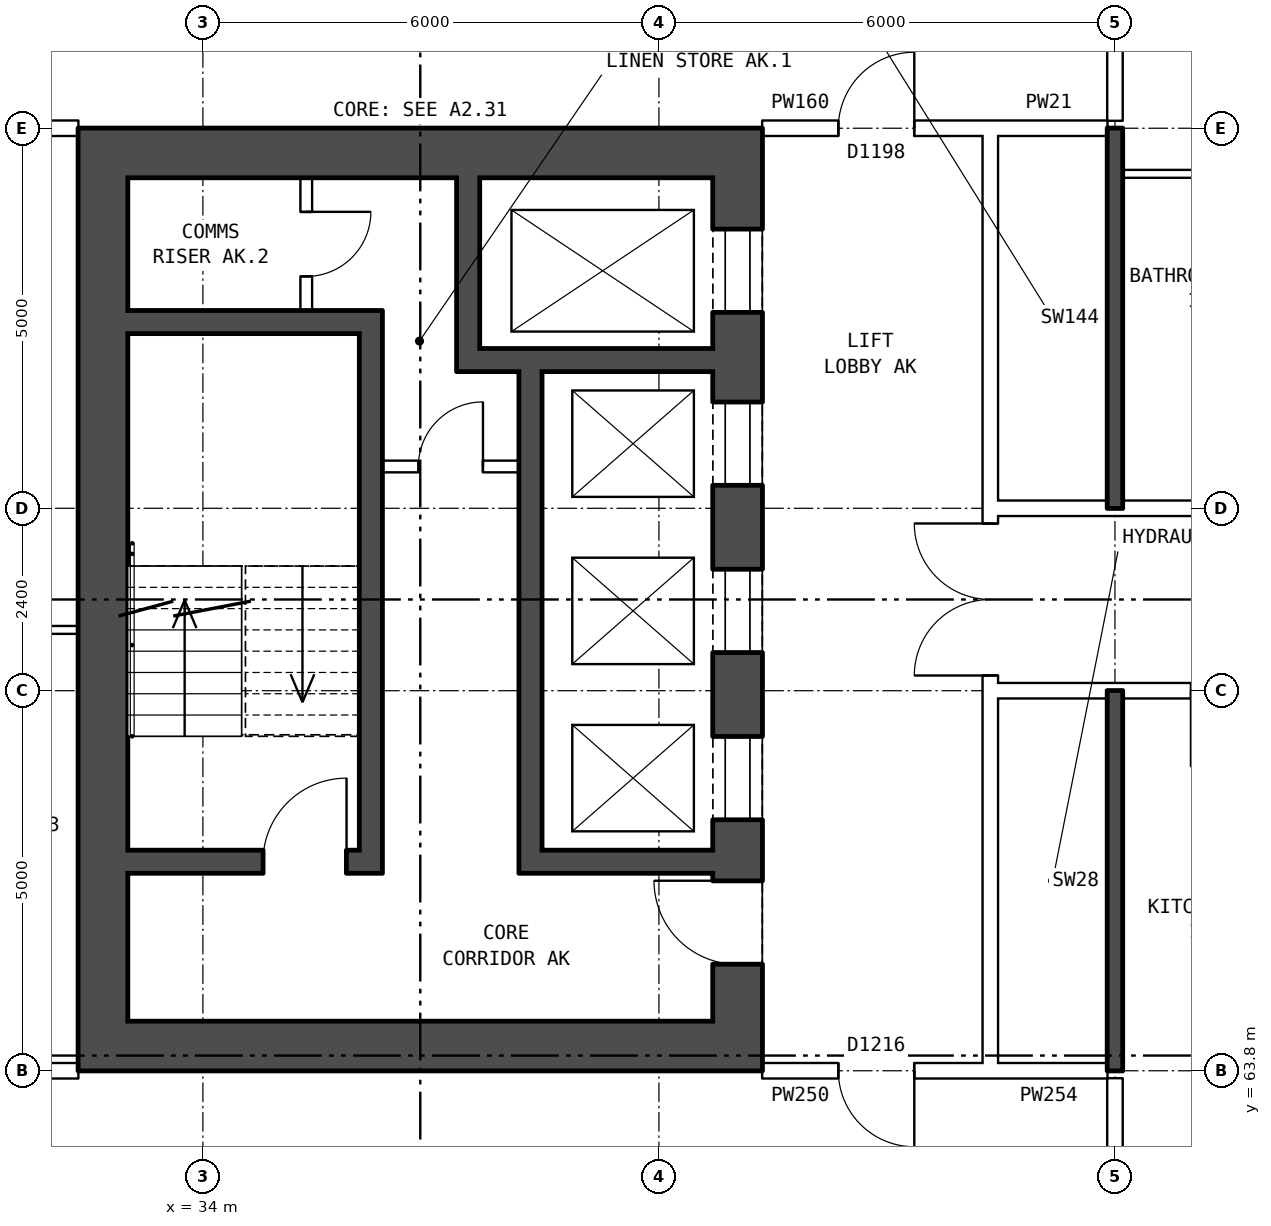
"""IFC4 building model, lengths in metres.
Left out: names, types, materials, properties, quantities, classifications, styles, units other than length and angle.
Written with IfcOpenShell. Run it as: python <this file> out.ifc"""

import sys

from ifc_helpers import new_model, si_unit, direction, frame, frame_2d, origin, place, context, subcontext, project, spatial, rectangle, extrude, element, fill, save


model = new_model("IFC4")
c1 = context("Model", 3, precision=1e-05, world=origin(), true_north=direction((0.0, 1.0)))
c2 = subcontext(c1, "Body", "Model", "MODEL_VIEW")
j1 = project(units=[si_unit("LENGTHUNIT", "METRE"), si_unit("PLANEANGLEUNIT", "RADIAN")], contexts=[c1])
p1 = place(None, origin())
s1 = spatial("IfcSite", under=j1, at=p1, CompositionType="ELEMENT")
p2 = place(p1, origin())
s2 = spatial("IfcBuilding", under=s1, at=p2, CompositionType="ELEMENT")
p3 = place(p2, frame((0.0, 0.0, 108.8)))
s3 = spatial("IfcBuildingStorey", under=s2, at=p3, CompositionType="ELEMENT", Elevation=108.8)
p4 = place(p3, frame((41.035, 75.55, 0.0), z_axis=(0.0, 0.0, 1.0), x_axis=(0.0, -1.0, 0.0)))
e1 = element("IfcWall", 1, at=p4, inside=s3, PredefinedType="SHEAR", context=c2, shape_type="SweptSolid", body=[
    extrude(rectangle(XDim=11.1, YDim=0.65, at=frame_2d((5.55, 0.0))), origin(), (0.0, 0.0, 1.0), 2.85),
])
p5 = place(p4, frame((0.675, 0.0, 0.0)))
e2 = element("IfcOpeningElement", 2, at=p5, cuts=e1, PredefinedType="OPENING", context=c2, shape_type="SweptSolid", body=[
    extrude(rectangle(XDim=1.1, YDim=2.1, at=frame_2d((0.55, 1.05))), frame((0.0, 0.335, 0.0), z_axis=(0.0, -1.0, 0.0), x_axis=(1.0, 0.0, 0.0)), (0.0, 0.0, 1.0), 0.67),
])
p6 = place(p4, frame((2.95, 0.0, 0.0)))
e3 = element("IfcOpeningElement", 3, at=p6, cuts=e1, PredefinedType="OPENING", context=c2, shape_type="SweptSolid", body=[
    extrude(rectangle(XDim=1.1, YDim=2.1, at=frame_2d((0.55, 1.05))), frame((0.0, 0.335, 0.0), z_axis=(0.0, -1.0, 0.0), x_axis=(1.0, 0.0, 0.0)), (0.0, 0.0, 1.0), 0.67),
])
p7 = place(p4, frame((5.15, 0.0, 0.0)))
e4 = element("IfcOpeningElement", 4, at=p7, cuts=e1, PredefinedType="OPENING", context=c2, shape_type="SweptSolid", body=[
    extrude(rectangle(XDim=1.1, YDim=2.1, at=frame_2d((0.55, 1.05))), frame((0.0, 0.335, 0.0), z_axis=(0.0, -1.0, 0.0), x_axis=(1.0, 0.0, 0.0)), (0.0, 0.0, 1.0), 0.67),
])
p8 = place(p4, frame((7.35, 0.0, 0.0)))
e5 = element("IfcOpeningElement", 5, at=p8, cuts=e1, PredefinedType="OPENING", context=c2, shape_type="SweptSolid", body=[
    extrude(rectangle(XDim=1.1, YDim=2.1, at=frame_2d((0.55, 1.05))), frame((0.0, 0.335, 0.0), z_axis=(0.0, -1.0, 0.0), x_axis=(1.0, 0.0, 0.0)), (0.0, 0.0, 1.0), 0.67),
])
p9 = place(p4, frame((9.25, 0.0, 0.0)))
e6 = element("IfcOpeningElement", 6, at=p9, cuts=e1, PredefinedType="OPENING", context=c2, shape_type="SweptSolid", body=[
    extrude(rectangle(XDim=1.1, YDim=2.1, at=frame_2d((0.55, 1.05))), frame((0.0, 0.335, 0.0), z_axis=(0.0, -1.0, 0.0), x_axis=(1.0, 0.0, 0.0)), (0.0, 0.0, 1.0), 0.67),
])
p10 = place(p3, frame((32.685, 75.55, 0.0), z_axis=(0.0, 0.0, 1.0), x_axis=(0.0, -1.0, 0.0)))
e7 = element("IfcWall", 7, at=p10, inside=s3, PredefinedType="SHEAR", context=c2, shape_type="SweptSolid", body=[
    extrude(rectangle(XDim=11.1, YDim=0.65, at=frame_2d((5.55, 0.0))), origin(), (0.0, 0.0, 1.0), 2.85),
])
for number, where, z_axis, x_axis in (
    (8, (41.36, 75.875, 0.0), (0.0, 0.0, 1.0), (-1.0, 0.0, 0.0)),
    (9, (41.36, 64.125, 0.0), (0.0, 0.0, 1.0), (-1.0, 0.0, 0.0)),
):
    element("IfcWall", number, at=place(p3, frame(where, z_axis=z_axis, x_axis=x_axis)), inside=s3, PredefinedType="SHEAR", context=c2, shape_type="SweptSolid", body=[
        extrude(rectangle(XDim=9.0, YDim=0.65, at=frame_2d((4.5, 0.0))), origin(), (0.0, 0.0, 1.0), 2.85),
    ])
p11 = place(p3, frame((36.06, 73.65, 0.0), z_axis=(0.0, 0.0, 1.0), x_axis=(-1.0, 0.0, 0.0)))
e10 = element("IfcWall", 10, at=p11, inside=s3, PredefinedType="SHEAR", context=c2, shape_type="SweptSolid", body=[
    extrude(rectangle(XDim=3.05, YDim=0.3, at=frame_2d((1.525, 0.0))), origin(), (0.0, 0.0, 1.0), 2.85),
])
p12 = place(p3, frame((40.71, 73.15, 0.0), z_axis=(0.0, 0.0, 1.0), x_axis=(-1.0, 0.0, 0.0)))
e11 = element("IfcWall", 11, at=p12, inside=s3, PredefinedType="SHEAR", context=c2, shape_type="SweptSolid", body=[
    extrude(rectangle(XDim=3.37, YDim=0.3, at=frame_2d((1.685, 0.0))), origin(), (0.0, 0.0, 1.0), 2.85),
])
p13 = place(p3, frame((38.16, 71.75, 0.0), z_axis=(0.0, 0.0, 1.0), x_axis=(-1.0, 0.0, 0.0)))
e12 = element("IfcWall", 12, at=p13, inside=s3, PredefinedType="PARTITIONING", context=c2, shape_type="SweptSolid", body=[
    extrude(rectangle(XDim=1.8, YDim=0.15, at=frame_2d((0.9, 0.0))), origin(), (0.0, 0.0, 1.0), 2.85),
])
p14 = place(p13, frame((0.475, 0.0, 0.0)))
e13 = element("IfcOpeningElement", 13, at=p14, cuts=e12, PredefinedType="OPENING", context=c2, shape_type="SweptSolid", body=[
    extrude(rectangle(XDim=0.85, YDim=2.1, at=frame_2d((0.425, 1.05))), frame((0.0, 0.085, 0.0), z_axis=(0.0, -1.0, 0.0), x_axis=(1.0, 0.0, 0.0)), (0.0, 0.0, 1.0), 0.17),
])
p15 = place(p3, frame((40.71, 66.55, 0.0), z_axis=(0.0, 0.0, 1.0), x_axis=(-1.0, 0.0, 0.0)))
e14 = element("IfcWall", 14, at=p15, inside=s3, PredefinedType="SHEAR", context=c2, shape_type="SweptSolid", body=[
    extrude(rectangle(XDim=2.25, YDim=0.3, at=frame_2d((1.125, 0.0))), origin(), (0.0, 0.0, 1.0), 2.85),
])
p16 = place(p3, frame((36.06, 66.55, 0.0), z_axis=(0.0, 0.0, 1.0), x_axis=(-1.0, 0.0, 0.0)))
e15 = element("IfcWall", 15, at=p16, inside=s3, PredefinedType="SHEAR", context=c2, shape_type="SweptSolid", body=[
    extrude(rectangle(XDim=3.05, YDim=0.3, at=frame_2d((1.525, 0.0))), origin(), (0.0, 0.0, 1.0), 2.85),
])
p17 = place(p16, frame((0.17, 0.0, 0.0)))
e16 = element("IfcOpeningElement", 16, at=p17, cuts=e15, PredefinedType="OPENING", context=c2, shape_type="SweptSolid", body=[
    extrude(rectangle(XDim=1.1, YDim=2.1, at=frame_2d((0.55, 1.05))), frame((0.0, 0.16, 0.0), z_axis=(0.0, -1.0, 0.0), x_axis=(1.0, 0.0, 0.0)), (0.0, 0.0, 1.0), 0.32),
])
p18 = place(p3, frame((38.31, 73.0, 0.0), z_axis=(0.0, 0.0, 1.0), x_axis=(0.0, -1.0, 0.0)))
e17 = element("IfcWall", 17, at=p18, inside=s3, PredefinedType="SHEAR", context=c2, shape_type="SweptSolid", body=[
    extrude(rectangle(XDim=6.6, YDim=0.3, at=frame_2d((3.3, 0.0))), origin(), (0.0, 0.0, 1.0), 2.85),
])
p19 = place(p3, frame((37.49, 75.55, 0.0), z_axis=(0.0, 0.0, 1.0), x_axis=(0.0, -1.0, 0.0)))
e18 = element("IfcWall", 18, at=p19, inside=s3, PredefinedType="SHEAR", context=c2, shape_type="SweptSolid", body=[
    extrude(rectangle(XDim=2.25, YDim=0.3, at=frame_2d((1.125, 0.0))), origin(), (0.0, 0.0, 1.0), 2.85),
])
p20 = place(p3, frame((36.21, 73.8, 0.0), z_axis=(0.0, 0.0, 1.0), x_axis=(0.0, -1.0, 0.0)))
e19 = element("IfcWall", 19, at=p20, inside=s3, PredefinedType="SHEAR", context=c2, shape_type="SweptSolid", body=[
    extrude(rectangle(XDim=7.4, YDim=0.3, at=frame_2d((3.7, 0.0))), origin(), (0.0, 0.0, 1.0), 2.85),
])
p21 = place(p3, frame((35.36, 75.55, 0.0), z_axis=(0.0, 0.0, 1.0), x_axis=(0.0, -1.0, 0.0)))
e20 = element("IfcWall", 20, at=p21, inside=s3, PredefinedType="PARTITIONING", context=c2, shape_type="SweptSolid", body=[
    extrude(rectangle(XDim=1.75, YDim=0.15, at=frame_2d((0.875, 0.0))), origin(), (0.0, 0.0, 1.0), 2.85),
])
p22 = place(p21, frame((0.45, 0.0, 0.0)))
e21 = element("IfcOpeningElement", 21, at=p22, cuts=e20, PredefinedType="OPENING", context=c2, shape_type="SweptSolid", body=[
    extrude(rectangle(XDim=0.85, YDim=2.1, at=frame_2d((0.425, 1.05))), frame((0.0, 0.085, 0.0), z_axis=(0.0, -1.0, 0.0), x_axis=(1.0, 0.0, 0.0)), (0.0, 0.0, 1.0), 0.17),
])
p23 = place(p3, frame((44.36, 63.9, 0.0), z_axis=(0.0, 0.0, 1.0), x_axis=(0.0, 1.0, 0.0)))
e22 = element("IfcWall", 22, at=p23, inside=s3, PredefinedType="PARTITIONING", context=c2, shape_type="SweptSolid", body=[
    extrude(rectangle(XDim=12.2, YDim=0.2, at=frame_2d((6.1, 0.0))), origin(), (0.0, 0.0, 1.0), 2.85),
])
p24 = place(p23, frame((5.1, 0.0, 0.0)))
e23 = element("IfcOpeningElement", 23, at=p24, cuts=e22, PredefinedType="OPENING", context=c2, shape_type="SweptSolid", body=[
    extrude(rectangle(XDim=2.0, YDim=2.1, at=frame_2d((1.0, 1.05))), frame((0.0, 0.11, 0.0), z_axis=(0.0, -1.0, 0.0), x_axis=(1.0, 0.0, 0.0)), (0.0, 0.0, 1.0), 0.22),
])
p25 = place(p3, frame((28.0, 63.8, 0.0), z_axis=(0.0, 0.0, 1.0), x_axis=(1.0, 0.0, 0.0)))
e24 = element("IfcWall", 24, at=p25, inside=s3, PredefinedType="PARTITIONING", context=c2, shape_type="SweptSolid", body=[
    extrude(rectangle(XDim=4.36, YDim=0.2, at=frame_2d((2.18, 0.0))), origin(), (0.0, 0.0, 1.0), 2.85),
])
p26 = place(p3, frame((41.36, 63.8, 0.0), z_axis=(0.0, 0.0, 1.0), x_axis=(1.0, 0.0, 0.0)))
e25 = element("IfcWall", 25, at=p26, inside=s3, PredefinedType="PARTITIONING", context=c2, shape_type="SweptSolid", body=[
    extrude(rectangle(XDim=3.0, YDim=0.2, at=frame_2d((1.5, 0.0))), origin(), (0.0, 0.0, 1.0), 2.85),
])
p27 = place(p26, frame((1.0, 0.0, 0.0)))
e26 = element("IfcOpeningElement", 26, at=p27, cuts=e25, PredefinedType="OPENING", context=c2, shape_type="SweptSolid", body=[
    extrude(rectangle(XDim=1.0, YDim=2.1, at=frame_2d((0.5, 1.05))), frame((0.0, 0.11, 0.0), z_axis=(0.0, -1.0, 0.0), x_axis=(1.0, 0.0, 0.0)), (0.0, 0.0, 1.0), 0.22),
])
p28 = place(p3, frame((44.36, 63.8, 0.0), z_axis=(0.0, 0.0, 1.0), x_axis=(1.0, 0.0, 0.0)))
e27 = element("IfcWall", 27, at=p28, inside=s3, PredefinedType="PARTITIONING", context=c2, shape_type="SweptSolid", body=[
    extrude(rectangle(XDim=1.54, YDim=0.2, at=frame_2d((0.77, 0.0))), origin(), (0.0, 0.0, 1.0), 2.85),
])
p29 = place(p3, frame((44.36, 68.8, 0.0), z_axis=(0.0, 0.0, 1.0), x_axis=(1.0, 0.0, 0.0)))
e28 = element("IfcWall", 28, at=p29, inside=s3, PredefinedType="PARTITIONING", context=c2, shape_type="SweptSolid", body=[
    extrude(rectangle(XDim=19.28, YDim=0.2, at=frame_2d((9.64, 0.0))), origin(), (0.0, 0.0, 1.0), 2.85),
])
p30 = place(p29, frame((17.46, 0.0, 0.0)))
e29 = element("IfcOpeningElement", 29, at=p30, cuts=e28, PredefinedType="OPENING", context=c2, shape_type="SweptSolid", body=[
    extrude(rectangle(XDim=1.0, YDim=2.1, at=frame_2d((0.5, 1.05))), frame((0.0, 0.11, 0.0), z_axis=(0.0, -1.0, 0.0), x_axis=(1.0, 0.0, 0.0)), (0.0, 0.0, 1.0), 0.22),
])
p31 = place(p29, frame((11.64, 0.0, 0.0)))
e30 = element("IfcOpeningElement", 30, at=p31, cuts=e28, PredefinedType="OPENING", context=c2, shape_type="SweptSolid", body=[
    extrude(rectangle(XDim=1.0, YDim=2.1, at=frame_2d((0.5, 1.05))), frame((0.0, 0.11, 0.0), z_axis=(0.0, -1.0, 0.0), x_axis=(1.0, 0.0, 0.0)), (0.0, 0.0, 1.0), 0.22),
])
p32 = place(p29, frame((2.64, 0.0, 0.0)))
e31 = element("IfcOpeningElement", 31, at=p32, cuts=e28, PredefinedType="OPENING", context=c2, shape_type="SweptSolid", body=[
    extrude(rectangle(XDim=1.0, YDim=2.1, at=frame_2d((0.5, 1.05))), frame((0.0, 0.11, 0.0), z_axis=(0.0, -1.0, 0.0), x_axis=(1.0, 0.0, 0.0)), (0.0, 0.0, 1.0), 0.22),
])
p33 = place(p3, frame((28.1, 69.6, 0.0), z_axis=(0.0, 0.0, 1.0), x_axis=(1.0, 0.0, 0.0)))
e32 = element("IfcWall", 32, at=p33, inside=s3, PredefinedType="PARTITIONING", context=c2, shape_type="SweptSolid", body=[
    extrude(rectangle(XDim=4.26, YDim=0.1, at=frame_2d((2.13, 0.0))), origin(), (0.0, 0.0, 1.0), 2.85),
])
p34 = place(p3, frame((44.36, 71.2, 0.0), z_axis=(0.0, 0.0, 1.0), x_axis=(1.0, 0.0, 0.0)))
e33 = element("IfcWall", 33, at=p34, inside=s3, PredefinedType="PARTITIONING", context=c2, shape_type="SweptSolid", body=[
    extrude(rectangle(XDim=19.28, YDim=0.2, at=frame_2d((9.64, 0.0))), origin(), (0.0, 0.0, 1.0), 2.85),
])
p35 = place(p34, frame((14.64, 0.0, 0.0)))
e34 = element("IfcOpeningElement", 34, at=p35, cuts=e33, PredefinedType="OPENING", context=c2, shape_type="SweptSolid", body=[
    extrude(rectangle(XDim=1.0, YDim=2.1, at=frame_2d((0.5, 1.05))), frame((0.0, 0.11, 0.0), z_axis=(0.0, -1.0, 0.0), x_axis=(1.0, 0.0, 0.0)), (0.0, 0.0, 1.0), 0.22),
])
p36 = place(p34, frame((5.64, 0.0, 0.0)))
e35 = element("IfcOpeningElement", 35, at=p36, cuts=e33, PredefinedType="OPENING", context=c2, shape_type="SweptSolid", body=[
    extrude(rectangle(XDim=1.0, YDim=2.1, at=frame_2d((0.5, 1.05))), frame((0.0, 0.11, 0.0), z_axis=(0.0, -1.0, 0.0), x_axis=(1.0, 0.0, 0.0)), (0.0, 0.0, 1.0), 0.22),
])
p37 = place(p3, frame((46.1, 75.6, 0.0), z_axis=(0.0, 0.0, 1.0), x_axis=(1.0, 0.0, 0.0)))
e36 = element("IfcWall", 36, at=p37, inside=s3, PredefinedType="PARTITIONING", context=c2, shape_type="SweptSolid", body=[
    extrude(rectangle(XDim=2.9, YDim=0.1, at=frame_2d((1.45, 0.0))), origin(), (0.0, 0.0, 1.0), 2.85),
])
p38 = place(p3, frame((28.0, 76.2, 0.0), z_axis=(0.0, 0.0, 1.0), x_axis=(1.0, 0.0, 0.0)))
e37 = element("IfcWall", 37, at=p38, inside=s3, PredefinedType="PARTITIONING", context=c2, shape_type="SweptSolid", body=[
    extrude(rectangle(XDim=4.36, YDim=0.2, at=frame_2d((2.18, 0.0))), origin(), (0.0, 0.0, 1.0), 2.85),
])
p39 = place(p3, frame((41.36, 76.2, 0.0), z_axis=(0.0, 0.0, 1.0), x_axis=(1.0, 0.0, 0.0)))
e38 = element("IfcWall", 38, at=p39, inside=s3, PredefinedType="PARTITIONING", context=c2, shape_type="SweptSolid", body=[
    extrude(rectangle(XDim=3.0, YDim=0.2, at=frame_2d((1.5, 0.0))), origin(), (0.0, 0.0, 1.0), 2.85),
])
p40 = place(p39, frame((1.0, 0.0, 0.0)))
e39 = element("IfcOpeningElement", 39, at=p40, cuts=e38, PredefinedType="OPENING", context=c2, shape_type="SweptSolid", body=[
    extrude(rectangle(XDim=1.0, YDim=2.1, at=frame_2d((0.5, 1.05))), frame((0.0, 0.11, 0.0), z_axis=(0.0, -1.0, 0.0), x_axis=(1.0, 0.0, 0.0)), (0.0, 0.0, 1.0), 0.22),
])
p41 = place(p3, frame((44.36, 76.2, 0.0), z_axis=(0.0, 0.0, 1.0), x_axis=(1.0, 0.0, 0.0)))
e40 = element("IfcWall", 40, at=p41, inside=s3, PredefinedType="PARTITIONING", context=c2, shape_type="SweptSolid", body=[
    extrude(rectangle(XDim=1.54, YDim=0.2, at=frame_2d((0.77, 0.0))), origin(), (0.0, 0.0, 1.0), 2.85),
])
p42 = place(p3, frame((46.0, 61.5, 0.0), z_axis=(0.0, 0.0, 1.0), x_axis=(0.0, 1.0, 0.0)))
e41 = element("IfcWall", 41, at=p42, inside=s3, PredefinedType="PARTITIONING", context=c2, shape_type="SweptSolid", body=[
    extrude(rectangle(XDim=2.2, YDim=0.2, at=frame_2d((1.1, 0.0))), origin(), (0.0, 0.0, 1.0), 2.85),
])
for number, where, z_axis, x_axis in (
    (42, (46.0, 63.8, 0.0), (0.0, 0.0, 1.0), (0.0, 1.0, 0.0)),
    (43, (46.0, 71.2, 0.0), (0.0, 0.0, 1.0), (0.0, 1.0, 0.0)),
):
    element("IfcWall", number, at=place(p3, frame(where, z_axis=z_axis, x_axis=x_axis)), inside=s3, PredefinedType="SOLIDWALL", context=c2, shape_type="SweptSolid", body=[
        extrude(rectangle(XDim=5.0, YDim=0.2, at=frame_2d((2.5, 0.0))), origin(), (0.0, 0.0, 1.0), 2.85),
    ])
p43 = place(p3, frame((46.0, 76.3, 0.0), z_axis=(0.0, 0.0, 1.0), x_axis=(0.0, 1.0, 0.0)))
e44 = element("IfcWall", 44, at=p43, inside=s3, PredefinedType="PARTITIONING", context=c2, shape_type="SweptSolid", body=[
    extrude(rectangle(XDim=2.2, YDim=0.2, at=frame_2d((1.1, 0.0))), origin(), (0.0, 0.0, 1.0), 2.85),
])
p44 = place(p5, origin())
e45 = element("IfcDoor", 45, at=p44, inside=s3, OperationType="DOUBLE_DOOR_SLIDING", PredefinedType="DOOR", context=c2, shape_type="SweptSolid", body=[
    extrude(rectangle(XDim=1.1, YDim=2.1, at=frame_2d((0.55, 1.05))), frame((0.0, -0.26, 0.0), z_axis=(0.0, -1.0, 0.0), x_axis=(1.0, 0.0, 0.0)), (0.0, 0.0, 1.0), 0.05),
])
fill(e2, e45)
p45 = place(p6, origin())
e46 = element("IfcDoor", 46, at=p45, inside=s3, OperationType="DOUBLE_DOOR_SLIDING", PredefinedType="DOOR", context=c2, shape_type="SweptSolid", body=[
    extrude(rectangle(XDim=1.1, YDim=2.1, at=frame_2d((0.55, 1.05))), frame((0.0, -0.26, 0.0), z_axis=(0.0, -1.0, 0.0), x_axis=(1.0, 0.0, 0.0)), (0.0, 0.0, 1.0), 0.05),
])
fill(e3, e46)
p46 = place(p7, origin())
e47 = element("IfcDoor", 47, at=p46, inside=s3, OperationType="DOUBLE_DOOR_SLIDING", PredefinedType="DOOR", context=c2, shape_type="SweptSolid", body=[
    extrude(rectangle(XDim=1.1, YDim=2.1, at=frame_2d((0.55, 1.05))), frame((0.0, -0.26, 0.0), z_axis=(0.0, -1.0, 0.0), x_axis=(1.0, 0.0, 0.0)), (0.0, 0.0, 1.0), 0.05),
])
fill(e4, e47)
p47 = place(p8, origin())
e48 = element("IfcDoor", 48, at=p47, inside=s3, OperationType="DOUBLE_DOOR_SLIDING", PredefinedType="DOOR", context=c2, shape_type="SweptSolid", body=[
    extrude(rectangle(XDim=1.1, YDim=2.1, at=frame_2d((0.55, 1.05))), frame((0.0, -0.26, 0.0), z_axis=(0.0, -1.0, 0.0), x_axis=(1.0, 0.0, 0.0)), (0.0, 0.0, 1.0), 0.05),
])
fill(e5, e48)
p48 = place(p9, frame((1.1, 0.0, 0.0), z_axis=(0.0, 0.0, 1.0), x_axis=(-1.0, 0.0, 0.0)))
e49 = element("IfcDoor", 49, at=p48, inside=s3, OperationType="SINGLE_SWING_RIGHT", PredefinedType="DOOR", context=c2, shape_type="SweptSolid", body=[
    extrude(rectangle(XDim=1.1, YDim=2.1, at=frame_2d((0.55, 1.05))), frame((0.0, 0.31, 0.0), z_axis=(0.0, -1.0, 0.0), x_axis=(1.0, 0.0, 0.0)), (0.0, 0.0, 1.0), 0.05),
])
fill(e6, e49)
p49 = place(p17, frame((1.1, 0.0, 0.0), z_axis=(0.0, 0.0, 1.0), x_axis=(-1.0, 0.0, 0.0)))
e50 = element("IfcDoor", 50, at=p49, inside=s3, OperationType="SINGLE_SWING_RIGHT", PredefinedType="DOOR", context=c2, shape_type="SweptSolid", body=[
    extrude(rectangle(XDim=1.1, YDim=2.1, at=frame_2d((0.55, 1.05))), frame((0.0, 0.025, 0.0), z_axis=(0.0, -1.0, 0.0), x_axis=(1.0, 0.0, 0.0)), (0.0, 0.0, 1.0), 0.05),
])
fill(e16, e50)
p50 = place(p14, frame((0.85, 0.0, 0.0), z_axis=(0.0, 0.0, 1.0), x_axis=(-1.0, 0.0, 0.0)))
e51 = element("IfcDoor", 51, at=p50, inside=s3, OperationType="SINGLE_SWING_RIGHT", PredefinedType="DOOR", context=c2, shape_type="SweptSolid", body=[
    extrude(rectangle(XDim=0.85, YDim=2.1, at=frame_2d((0.425, 1.05))), frame((0.0, 0.025, 0.0), z_axis=(0.0, -1.0, 0.0), x_axis=(1.0, 0.0, 0.0)), (0.0, 0.0, 1.0), 0.05),
])
fill(e13, e51)
p51 = place(p22, origin())
e52 = element("IfcDoor", 52, at=p51, inside=s3, OperationType="SINGLE_SWING_LEFT", PredefinedType="DOOR", context=c2, shape_type="SweptSolid", body=[
    extrude(rectangle(XDim=0.85, YDim=2.1, at=frame_2d((0.425, 1.05))), frame((0.0, 0.025, 0.0), z_axis=(0.0, -1.0, 0.0), x_axis=(1.0, 0.0, 0.0)), (0.0, 0.0, 1.0), 0.05),
])
fill(e21, e52)
p52 = place(p24, origin())
e53 = element("IfcDoor", 53, at=p52, inside=s3, OperationType="DOUBLE_DOOR_SINGLE_SWING", PredefinedType="DOOR", context=c2, shape_type="SweptSolid", body=[
    extrude(rectangle(XDim=2.0, YDim=2.1, at=frame_2d((1.0, 1.05))), frame((0.0, 0.025, 0.0), z_axis=(0.0, -1.0, 0.0), x_axis=(1.0, 0.0, 0.0)), (0.0, 0.0, 1.0), 0.05),
])
fill(e23, e53)
p53 = place(p27, frame((1.0, 0.0, 0.0), z_axis=(0.0, 0.0, 1.0), x_axis=(-1.0, 0.0, 0.0)))
e54 = element("IfcDoor", 54, at=p53, inside=s3, OperationType="SINGLE_SWING_LEFT", PredefinedType="DOOR", context=c2, shape_type="SweptSolid", body=[
    extrude(rectangle(XDim=1.0, YDim=2.1, at=frame_2d((0.5, 1.05))), frame((0.0, 0.025, 0.0), z_axis=(0.0, -1.0, 0.0), x_axis=(1.0, 0.0, 0.0)), (0.0, 0.0, 1.0), 0.05),
])
fill(e26, e54)
p54 = place(p40, origin())
e55 = element("IfcDoor", 55, at=p54, inside=s3, OperationType="SINGLE_SWING_RIGHT", PredefinedType="DOOR", context=c2, shape_type="SweptSolid", body=[
    extrude(rectangle(XDim=1.0, YDim=2.1, at=frame_2d((0.5, 1.05))), frame((0.0, 0.025, 0.0), z_axis=(0.0, -1.0, 0.0), x_axis=(1.0, 0.0, 0.0)), (0.0, 0.0, 1.0), 0.05),
])
fill(e39, e55)
save(model, sys.argv[1])
